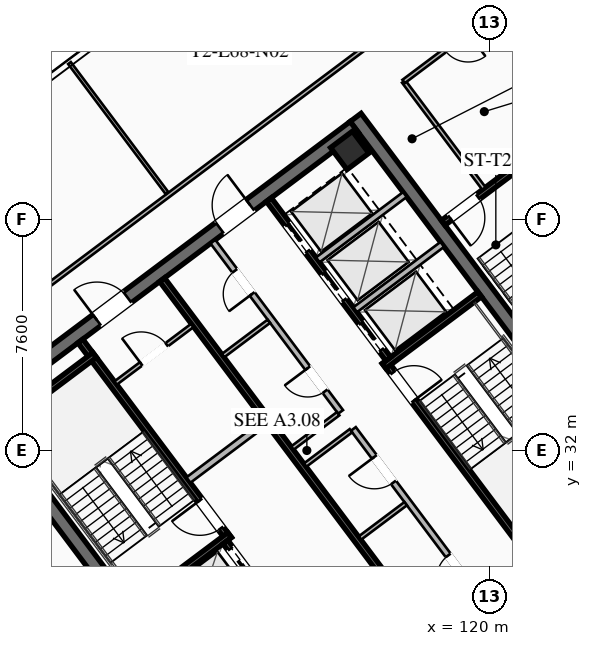
"""IFC4 building model, lengths in metres.
Left out: names, types, materials, properties, quantities, classifications, styles, units other than length and angle.
Written with IfcOpenShell. Run it as: python <this file> out.ifc"""

import sys

from ifc_helpers import new_model, si_unit, direction, frame, frame_2d, origin, origin_2d, place, context, subcontext, project, spatial, rectangle, hollow_rectangle, extrude, element, fill, save


model = new_model("IFC4")
c1 = context("Model", 3, precision=1e-05, world=origin(), true_north=direction((0.0, 1.0)))
c2 = subcontext(c1, "Body", "Model", "MODEL_VIEW")
j1 = project(units=[si_unit("LENGTHUNIT", "METRE"), si_unit("PLANEANGLEUNIT", "RADIAN")], contexts=[c1])
p1 = place(None, origin())
s1 = spatial("IfcSite", under=j1, at=p1, CompositionType="ELEMENT")
p2 = place(p1, origin())
s2 = spatial("IfcBuilding", under=s1, at=p2, CompositionType="ELEMENT")
p3 = place(p2, frame((0.0, 0.0, 251.4)))
s3 = spatial("IfcBuildingStorey", under=s2, at=p3, CompositionType="ELEMENT", Elevation=251.4)
for number, where, z_axis, x_axis in (
    (1, (112.396, 21.047, 0.0), (0.0, 0.0, 1.0), (-0.6, 0.8, 0.0)),
    (2, (115.604, 42.953, 0.0), (0.0, 0.0, 1.0), (0.6, -0.8, 0.0)),
):
    element("IfcWall", number, at=place(p3, frame(where, z_axis=z_axis, x_axis=x_axis)), inside=s3, PredefinedType="SHEAR", context=c2, shape_type="SweptSolid", body=[
        extrude(rectangle(XDim=15.6, YDim=0.45, at=frame_2d((7.8, 0.0))), origin(), (0.0, 0.0, 1.0), 4.0),
    ])
p4 = place(p3, frame((124.649, 30.518, 0.0), z_axis=(0.0, 0.0, 1.0), x_axis=(-0.8, -0.6, 0.0)))
e3 = element("IfcWall", 3, at=p4, inside=s3, PredefinedType="SHEAR", context=c2, shape_type="SweptSolid", body=[
    extrude(rectangle(XDim=15.26, YDim=0.45, at=frame_2d((7.63, 0.0))), origin(), (0.0, 0.0, 1.0), 4.0),
])
p5 = place(p4, frame((9.33, 0.0, 0.0)))
e4 = element("IfcOpeningElement", 4, at=p5, cuts=e3, PredefinedType="OPENING", context=c2, shape_type="SweptSolid", body=[
    extrude(rectangle(XDim=1.25, YDim=2.25, at=frame_2d((0.625, 1.125))), frame((0.0, 0.235, 0.0), z_axis=(0.0, -1.0, 0.0), x_axis=(1.0, 0.0, 0.0)), (0.0, 0.0, 1.0), 0.47),
])
p6 = place(p4, frame((4.28, 0.0, 0.0)))
e5 = element("IfcOpeningElement", 5, at=p6, cuts=e3, PredefinedType="OPENING", context=c2, shape_type="SweptSolid", body=[
    extrude(rectangle(XDim=1.25, YDim=2.25, at=frame_2d((0.625, 1.125))), frame((0.0, 0.235, 0.0), z_axis=(0.0, -1.0, 0.0), x_axis=(1.0, 0.0, 0.0)), (0.0, 0.0, 1.0), 0.47),
])
p7 = place(p3, frame((103.351, 33.482, 0.0), z_axis=(0.0, 0.0, 1.0), x_axis=(0.8, 0.6, 0.0)))
e6 = element("IfcWall", 6, at=p7, inside=s3, PredefinedType="SHEAR", context=c2, shape_type="SweptSolid", body=[
    extrude(rectangle(XDim=15.26, YDim=0.45, at=frame_2d((7.63, 0.0))), origin(), (0.0, 0.0, 1.0), 4.0),
])
p8 = place(p7, frame((4.68, 0.0, 0.0)))
e7 = element("IfcOpeningElement", 7, at=p8, cuts=e6, PredefinedType="OPENING", context=c2, shape_type="SweptSolid", body=[
    extrude(rectangle(XDim=1.25, YDim=2.25, at=frame_2d((0.625, 1.125))), frame((0.0, 0.235, 0.0), z_axis=(0.0, -1.0, 0.0), x_axis=(1.0, 0.0, 0.0)), (0.0, 0.0, 1.0), 0.47),
])
p9 = place(p7, frame((9.73, 0.0, 0.0)))
e8 = element("IfcOpeningElement", 8, at=p9, cuts=e6, PredefinedType="OPENING", context=c2, shape_type="SweptSolid", body=[
    extrude(rectangle(XDim=1.25, YDim=2.25, at=frame_2d((0.625, 1.125))), frame((0.0, 0.235, 0.0), z_axis=(0.0, -1.0, 0.0), x_axis=(1.0, 0.0, 0.0)), (0.0, 0.0, 1.0), 0.47),
])
p10 = place(p3, frame((115.41, 41.87, 0.0), z_axis=(0.0, 0.0, 1.0), x_axis=(0.799999996291, 0.600000004945, 0.0)))
e9 = element("IfcColumn", 9, at=p10, inside=s3, PredefinedType="COLUMN", context=c2, shape_type="SweptSolid", body=[
    extrude(hollow_rectangle(XDim=0.9, YDim=0.9, WallThickness=0.04, at=origin_2d()), origin(), (0.0, 0.0, 1.0), 3.78),
])
p11 = place(p3, frame((111.44, 29.08, 0.0), z_axis=(0.0, 0.0, 1.0), x_axis=(-0.59999041401, 0.800007189403, 0.0)))
e10 = element("IfcWall", 10, at=p11, inside=s3, PredefinedType="SHEAR", context=c2, shape_type="SweptSolid", body=[
    extrude(rectangle(XDim=8.15, YDim=0.2, at=frame_2d((4.075, 0.0))), origin(), (0.0, 0.0, 1.0), 3.78),
])
p12 = place(p11, frame((0.45, 0.0, 0.0)))
e11 = element("IfcOpeningElement", 11, at=p12, cuts=e10, PredefinedType="OPENING", context=c2, shape_type="SweptSolid", body=[
    extrude(rectangle(XDim=1.15, YDim=2.2, at=frame_2d((0.575, 1.1))), frame((0.0, 0.11, 0.0), z_axis=(0.0, -1.0, 0.0), x_axis=(1.0, 0.0, 0.0)), (0.0, 0.0, 1.0), 0.22),
])
for number, where, z_axis, x_axis in (
    (12, (108.316, 26.862, 0.0), (0.0, 0.0, 1.0), (0.8, 0.6, 0.0)),
    (13, (103.876, 32.782, 0.0), (0.0, 0.0, 1.0), (0.8, 0.6, 0.0)),
):
    element("IfcWall", number, at=place(p3, frame(where, z_axis=z_axis, x_axis=x_axis)), inside=s3, PredefinedType="SHEAR", context=c2, shape_type="SweptSolid", body=[
        extrude(rectangle(XDim=3.93, YDim=0.2, at=frame_2d((1.965, 0.0))), origin(), (0.0, 0.0, 1.0), 3.78),
    ])
p13 = place(p3, frame((116.56, 34.92, 0.0), z_axis=(0.0, 0.0, 1.0), x_axis=(0.59999041401, -0.800007189403, 0.0)))
e14 = element("IfcWall", 14, at=p13, inside=s3, PredefinedType="SHEAR", context=c2, shape_type="SweptSolid", body=[
    extrude(rectangle(XDim=8.15, YDim=0.2, at=frame_2d((4.075, 0.0))), origin(), (0.0, 0.0, 1.0), 3.78),
])
p14 = place(p13, frame((0.45, 0.0, 0.0)))
e15 = element("IfcOpeningElement", 15, at=p14, cuts=e14, PredefinedType="OPENING", context=c2, shape_type="SweptSolid", body=[
    extrude(rectangle(XDim=1.15, YDim=2.2, at=frame_2d((0.575, 1.1))), frame((0.0, 0.11, 0.0), z_axis=(0.0, -1.0, 0.0), x_axis=(1.0, 0.0, 0.0)), (0.0, 0.0, 1.0), 0.22),
])
p15 = place(p3, frame((116.54, 34.78, 0.0), z_axis=(0.0, 0.0, 1.0), x_axis=(0.800014909178, 0.599980120581, 0.0)))
e16 = element("IfcWall", 16, at=p15, inside=s3, PredefinedType="SHEAR", context=c2, shape_type="SweptSolid", body=[
    extrude(rectangle(XDim=3.93, YDim=0.2, at=frame_2d((1.965, 0.0))), origin(), (0.0, 0.0, 1.0), 3.78),
])
p16 = place(p3, frame((118.058, 25.856, 0.0), z_axis=(0.0, 0.0, 1.0), x_axis=(-0.600002657301, 0.799998007018, 0.0)))
e17 = element("IfcWall", 17, at=p16, inside=s3, PredefinedType="SHEAR", context=c2, shape_type="SweptSolid", body=[
    extrude(rectangle(XDim=14.7, YDim=0.2, at=frame_2d((7.35, 0.0))), origin(), (0.0, 0.0, 1.0), 3.78),
])
p17 = place(p3, frame((110.104, 31.028, 0.0), z_axis=(0.0, 0.0, 1.0), x_axis=(0.800018601094, 0.59997519774, 0.0)))
e18 = element("IfcWall", 18, at=p17, inside=s3, PredefinedType="SOLIDWALL", context=c2, shape_type="SweptSolid", body=[
    extrude(rectangle(XDim=3.15, YDim=0.22, at=frame_2d((1.575, 0.0))), origin(), (0.0, 0.0, 1.0), 2.971),
])
p18 = place(p3, frame((115.25, 23.75, 0.0), z_axis=(0.0, 0.0, 1.0), x_axis=(-0.599994036198, 0.800004472816, 0.0)))
e19 = element("IfcWall", 19, at=p18, inside=s3, PredefinedType="SHEAR", context=c2, shape_type="SweptSolid", body=[
    extrude(rectangle(XDim=6.55, YDim=0.2, at=frame_2d((3.275, 0.0))), origin(), (0.0, 0.0, 1.0), 3.78),
])
p19 = place(p18, frame((4.975, 0.0, 0.0)))
e20 = element("IfcOpeningElement", 20, at=p19, cuts=e19, PredefinedType="OPENING", context=c2, shape_type="SweptSolid", body=[
    extrude(rectangle(XDim=1.3, YDim=2.25, at=frame_2d((0.65, 1.125))), frame((0.0, 0.11, 0.0), z_axis=(0.0, -1.0, 0.0), x_axis=(1.0, 0.0, 0.0)), (0.0, 0.0, 1.0), 0.22),
])
p20 = place(p18, frame((2.975, 0.0, 0.0)))
e21 = element("IfcOpeningElement", 21, at=p20, cuts=e19, PredefinedType="OPENING", context=c2, shape_type="SweptSolid", body=[
    extrude(rectangle(XDim=1.3, YDim=2.25, at=frame_2d((0.65, 1.125))), frame((0.0, 0.11, 0.0), z_axis=(0.0, -1.0, 0.0), x_axis=(1.0, 0.0, 0.0)), (0.0, 0.0, 1.0), 0.22),
])
p21 = place(p18, frame((0.775, 0.0, 0.0)))
e22 = element("IfcOpeningElement", 22, at=p21, cuts=e19, PredefinedType="OPENING", context=c2, shape_type="SweptSolid", body=[
    extrude(rectangle(XDim=1.3, YDim=2.25, at=frame_2d((0.65, 1.125))), frame((0.0, 0.11, 0.0), z_axis=(0.0, -1.0, 0.0), x_axis=(1.0, 0.0, 0.0)), (0.0, 0.0, 1.0), 0.22),
])
p22 = place(p3, frame((112.75, 40.25, 0.0), z_axis=(0.0, 0.0, 1.0), x_axis=(0.599994036198, -0.800004472816, 0.0)))
e23 = element("IfcWall", 23, at=p22, inside=s3, PredefinedType="SHEAR", context=c2, shape_type="SweptSolid", body=[
    extrude(rectangle(XDim=6.55, YDim=0.2, at=frame_2d((3.275, 0.0))), origin(), (0.0, 0.0, 1.0), 3.78),
])
p23 = place(p22, frame((5.075, 0.0, 0.0)))
e24 = element("IfcOpeningElement", 24, at=p23, cuts=e23, PredefinedType="OPENING", context=c2, shape_type="SweptSolid", body=[
    extrude(rectangle(XDim=1.1, YDim=2.2, at=frame_2d((0.55, 1.1))), frame((0.0, 0.11, 0.0), z_axis=(0.0, -1.0, 0.0), x_axis=(1.0, 0.0, 0.0)), (0.0, 0.0, 1.0), 0.22),
])
p24 = place(p22, frame((3.025, 0.0, 0.0)))
e25 = element("IfcOpeningElement", 25, at=p24, cuts=e23, PredefinedType="OPENING", context=c2, shape_type="SweptSolid", body=[
    extrude(rectangle(XDim=1.1, YDim=2.2, at=frame_2d((0.55, 1.1))), frame((0.0, 0.11, 0.0), z_axis=(0.0, -1.0, 0.0), x_axis=(1.0, 0.0, 0.0)), (0.0, 0.0, 1.0), 0.22),
])
p25 = place(p22, frame((1.025, 0.0, 0.0)))
e26 = element("IfcOpeningElement", 26, at=p25, cuts=e23, PredefinedType="OPENING", context=c2, shape_type="SweptSolid", body=[
    extrude(rectangle(XDim=1.1, YDim=2.2, at=frame_2d((0.55, 1.1))), frame((0.0, 0.11, 0.0), z_axis=(0.0, -1.0, 0.0), x_axis=(1.0, 0.0, 0.0)), (0.0, 0.0, 1.0), 0.22),
])
for number, where, z_axis, x_axis in (
    (27, (115.59, 36.63, 0.0), (0.0, 0.0, 1.0), (0.8, 0.6, 0.0)),
    (28, (114.36, 38.27, 0.0), (0.0, 0.0, 1.0), (0.8, 0.6, 0.0)),
):
    element("IfcWall", number, at=place(p3, frame(where, z_axis=z_axis, x_axis=x_axis)), inside=s3, PredefinedType="SOLIDWALL", context=c2, shape_type="SweptSolid", body=[
        extrude(rectangle(XDim=3.58, YDim=0.2, at=frame_2d((1.79, 0.0))), origin(), (0.0, 0.0, 1.0), 3.78),
    ])
p26 = place(p3, frame((107.71, 34.22, 0.0), z_axis=(0.0, 0.0, 1.0), x_axis=(0.799981399002, 0.60002480053, 0.0)))
e29 = element("IfcWall", 29, at=p26, inside=s3, PredefinedType="PARTITIONING", context=c2, shape_type="SweptSolid", body=[
    extrude(rectangle(XDim=3.15, YDim=0.135, at=frame_2d((1.575, 0.0))), origin(), (0.0, 0.0, 1.0), 2.971),
])
p27 = place(p26, frame((1.05, 0.0, 0.0)))
e30 = element("IfcOpeningElement", 30, at=p27, cuts=e29, PredefinedType="OPENING", context=c2, shape_type="SweptSolid", body=[
    extrude(rectangle(XDim=1.05, YDim=2.2, at=frame_2d((0.525, 1.1))), frame((0.0, 0.077, 0.0), z_axis=(0.0, -1.0, 0.0), x_axis=(1.0, 0.0, 0.0)), (0.0, 0.0, 1.0), 0.155),
])
p28 = place(p3, frame((119.73, 27.11, 0.0), z_axis=(0.0, 0.0, 1.0), x_axis=(-0.600005580459, 0.799995814625, 0.0)))
e31 = element("IfcWall", 31, at=p28, inside=s3, PredefinedType="SOLIDWALL", context=c2, shape_type="SweptSolid", body=[
    extrude(rectangle(XDim=7.0, YDim=0.2, at=frame_2d((3.5, 0.0))), origin(), (0.0, 0.0, 1.0), 2.971),
])
p29 = place(p28, frame((0.85, 0.0, 0.0)))
e32 = element("IfcOpeningElement", 32, at=p29, cuts=e31, PredefinedType="OPENING", context=c2, shape_type="SweptSolid", body=[
    extrude(rectangle(XDim=0.95, YDim=2.05, at=frame_2d((0.475, 1.025))), frame((0.0, 0.11, 0.0), z_axis=(0.0, -1.0, 0.0), x_axis=(1.0, 0.0, 0.0)), (0.0, 0.0, 1.0), 0.22),
])
p30 = place(p28, frame((4.8, 0.0, 0.0)))
e33 = element("IfcOpeningElement", 33, at=p30, cuts=e31, PredefinedType="OPENING", context=c2, shape_type="SweptSolid", body=[
    extrude(rectangle(XDim=1.05, YDim=2.2, at=frame_2d((0.525, 1.1))), frame((0.0, 0.11, 0.0), z_axis=(0.0, -1.0, 0.0), x_axis=(1.0, 0.0, 0.0)), (0.0, 0.0, 1.0), 0.22),
])
for number, where, z_axis, x_axis in (
    (34, (113.946, 31.522, 0.0), (0.0, 0.0, 1.0), (0.8, 0.6, 0.0)),
    (35, (115.746, 29.122, 0.0), (0.0, 0.0, 1.0), (0.8, 0.6, 0.0)),
):
    element("IfcWall", number, at=place(p3, frame(where, z_axis=z_axis, x_axis=x_axis)), inside=s3, PredefinedType="PARTITIONING", context=c2, shape_type="SweptSolid", body=[
        extrude(rectangle(XDim=1.88, YDim=0.135, at=frame_2d((0.94, 0.0))), origin(), (0.0, 0.0, 1.0), 2.971),
    ])
p31 = place(p3, frame((115.11, 33.27, 0.0), z_axis=(0.0, 0.0, 1.0), x_axis=(-0.600011160345, 0.79999162962, 0.0)))
e36 = element("IfcWall", 36, at=p31, inside=s3, PredefinedType="SOLIDWALL", context=c2, shape_type="SweptSolid", body=[
    extrude(rectangle(XDim=7.0, YDim=0.2, at=frame_2d((3.5, 0.0))), origin(), (0.0, 0.0, 1.0), 2.971),
])
p32 = place(p31, frame((0.85, 0.0, 0.0)))
e37 = element("IfcOpeningElement", 37, at=p32, cuts=e36, PredefinedType="OPENING", context=c2, shape_type="SweptSolid", body=[
    extrude(rectangle(XDim=0.95, YDim=2.05, at=frame_2d((0.475, 1.025))), frame((0.0, 0.11, 0.0), z_axis=(0.0, -1.0, 0.0), x_axis=(1.0, 0.0, 0.0)), (0.0, 0.0, 1.0), 0.22),
])
p33 = place(p31, frame((4.85, 0.0, 0.0)))
e38 = element("IfcOpeningElement", 38, at=p33, cuts=e36, PredefinedType="OPENING", context=c2, shape_type="SweptSolid", body=[
    extrude(rectangle(XDim=0.95, YDim=2.05, at=frame_2d((0.475, 1.025))), frame((0.0, 0.11, 0.0), z_axis=(0.0, -1.0, 0.0), x_axis=(1.0, 0.0, 0.0)), (0.0, 0.0, 1.0), 0.22),
])
p34 = place(p3, frame((113.526, 32.082, 0.0), z_axis=(0.0, 0.0, 1.0), x_axis=(0.800046745961, 0.599937666993, 0.0)))
e39 = element("IfcWall", 39, at=p34, inside=s3, PredefinedType="PARTITIONING", context=c2, shape_type="SweptSolid", body=[
    extrude(rectangle(XDim=1.88, YDim=0.135, at=frame_2d((0.94, 0.0))), origin(), (0.0, 0.0, 1.0), 2.971),
])
p35 = place(p3, frame((111.246, 35.122, 0.0), z_axis=(0.0, 0.0, 1.0), x_axis=(0.8, 0.6, 0.0)))
e40 = element("IfcWall", 40, at=p35, inside=s3, PredefinedType="PARTITIONING", context=c2, shape_type="SweptSolid", body=[
    extrude(rectangle(XDim=1.88, YDim=0.135, at=frame_2d((0.94, 0.0))), origin(), (0.0, 0.0, 1.0), 2.971),
])
p36 = place(p3, frame((121.204, 41.528, 0.0), z_axis=(0.0, 0.0, 1.0), x_axis=(-0.800017232136, -0.599977023131, 0.0)))
e41 = element("IfcWall", 41, at=p36, inside=s3, PredefinedType="SHEAR", context=c2, shape_type="SweptSolid", body=[
    extrude(rectangle(XDim=3.4, YDim=0.2, at=frame_2d((1.7, 0.0))), origin(), (0.0, 0.0, 1.0), 3.78),
])
p37 = place(p36, frame((1.975, 0.0, 0.0)))
e42 = element("IfcOpeningElement", 42, at=p37, cuts=e41, PredefinedType="OPENING", context=c2, shape_type="SweptSolid", body=[
    extrude(rectangle(XDim=1.15, YDim=2.2, at=frame_2d((0.575, 1.1))), frame((0.0, 0.11, 0.0), z_axis=(0.0, -1.0, 0.0), x_axis=(1.0, 0.0, 0.0)), (0.0, 0.0, 1.0), 0.22),
])
p38 = place(p3, frame((119.824, 40.618, 0.0), z_axis=(0.0, 0.0, 1.0), x_axis=(-0.599982243973, 0.800013316712, 0.0)))
e43 = element("IfcWall", 43, at=p38, inside=s3, PredefinedType="PARTITIONING", context=c2, shape_type="SweptSolid", body=[
    extrude(rectangle(XDim=4.4, YDim=0.135, at=frame_2d((2.2, 0.0))), origin(), (0.0, 0.0, 1.0), 2.971),
])
p39 = place(p3, frame((99.746, 33.122, 0.0), z_axis=(0.0, 0.0, 1.0), x_axis=(0.800001242445, 0.599998343403, 0.0)))
e44 = element("IfcWall", 44, at=p39, inside=s3, PredefinedType="PARTITIONING", context=c2, shape_type="SweptSolid", body=[
    extrude(rectangle(XDim=23.58, YDim=0.135, at=frame_2d((11.79, 0.0))), origin(), (0.0, 0.0, 1.0), 2.971),
])
p40 = place(p39, frame((0.3, 0.0, 0.0)))
e45 = element("IfcOpeningElement", 45, at=p40, cuts=e44, PredefinedType="OPENING", context=c2, shape_type="SweptSolid", body=[
    extrude(rectangle(XDim=0.95, YDim=2.05, at=frame_2d((0.475, 1.025))), frame((0.0, 0.077, 0.0), z_axis=(0.0, -1.0, 0.0), x_axis=(1.0, 0.0, 0.0)), (0.0, 0.0, 1.0), 0.155),
])
p41 = place(p39, frame((22.33, 0.0, 0.0)))
e46 = element("IfcOpeningElement", 46, at=p41, cuts=e44, PredefinedType="OPENING", context=c2, shape_type="SweptSolid", body=[
    extrude(rectangle(XDim=0.95, YDim=2.05, at=frame_2d((0.475, 1.025))), frame((0.0, 0.077, 0.0), z_axis=(0.0, -1.0, 0.0), x_axis=(1.0, 0.0, 0.0)), (0.0, 0.0, 1.0), 0.155),
])
p42 = place(p3, frame((109.402, 40.464, 0.0), z_axis=(0.0, 0.0, 1.0), x_axis=(-0.600043807911, 0.799967142192, 0.0)))
e47 = element("IfcWall", 47, at=p42, inside=s3, PredefinedType="PARTITIONING", context=c2, shape_type="SweptSolid", body=[
    extrude(rectangle(XDim=5.35, YDim=0.11, at=frame_2d((2.675, 0.0))), origin(), (0.0, 0.0, 1.0), 2.971),
])
p43 = place(p3, frame((121.224, 47.168, 0.0), z_axis=(0.0, 0.0, 1.0), x_axis=(-0.8, -0.6, 0.0)))
e48 = element("IfcWall", 48, at=p43, inside=s3, PredefinedType="PARTITIONING", context=c2, shape_type="SweptSolid", body=[
    extrude(rectangle(XDim=5.05, YDim=0.135, at=frame_2d((2.525, 0.0))), origin(), (0.0, 0.0, 1.0), 2.971),
])
p44 = place(p43, frame((2.4, 0.0, 0.0)))
e49 = element("IfcOpeningElement", 49, at=p44, cuts=e48, PredefinedType="OPENING", context=c2, shape_type="SweptSolid", body=[
    extrude(rectangle(XDim=0.95, YDim=2.05, at=frame_2d((0.475, 1.025))), frame((0.0, 0.077, 0.0), z_axis=(0.0, -1.0, 0.0), x_axis=(1.0, 0.0, 0.0)), (0.0, 0.0, 1.0), 0.155),
])
p45 = place(p3, frame((111.86, 16.97, 0.0), z_axis=(0.0, 0.0, 1.0), x_axis=(-0.60000194242, 0.799998543181, 0.0)))
e50 = element("IfcWall", 50, at=p45, inside=s3, PredefinedType="PARTITIONING", context=c2, shape_type="SweptSolid", body=[
    extrude(rectangle(XDim=20.11, YDim=0.135, at=frame_2d((10.055, 0.0))), origin(), (0.0, 0.0, 1.0), 2.971),
])
p46 = place(p45, frame((0.3, 0.0, 0.0)))
e51 = element("IfcOpeningElement", 51, at=p46, cuts=e50, PredefinedType="OPENING", context=c2, shape_type="SweptSolid", body=[
    extrude(rectangle(XDim=0.95, YDim=2.05, at=frame_2d((0.475, 1.025))), frame((0.0, 0.077, 0.0), z_axis=(0.0, -1.0, 0.0), x_axis=(1.0, 0.0, 0.0)), (0.0, 0.0, 1.0), 0.155),
])
p47 = place(p8, origin())
e52 = element("IfcDoor", 52, at=p47, inside=s3, OperationType="SINGLE_SWING_LEFT", PredefinedType="DOOR", context=c2, shape_type="SweptSolid", body=[
    extrude(rectangle(XDim=1.25, YDim=2.25, at=frame_2d((0.625, 1.125))), frame((0.0, 0.025, 0.0), z_axis=(0.0, -1.0, 0.0), x_axis=(1.0, 0.0, 0.0)), (0.0, 0.0, 1.0), 0.05),
])
fill(e7, e52)
p48 = place(p9, origin())
e53 = element("IfcDoor", 53, at=p48, inside=s3, OperationType="SINGLE_SWING_RIGHT", PredefinedType="DOOR", context=c2, shape_type="SweptSolid", body=[
    extrude(rectangle(XDim=1.25, YDim=2.25, at=frame_2d((0.625, 1.125))), frame((0.0, 0.025, 0.0), z_axis=(0.0, -1.0, 0.0), x_axis=(1.0, 0.0, 0.0)), (0.0, 0.0, 1.0), 0.05),
])
fill(e8, e53)
p49 = place(p12, origin())
e54 = element("IfcDoor", 54, at=p49, inside=s3, OperationType="SINGLE_SWING_RIGHT", PredefinedType="DOOR", context=c2, shape_type="SweptSolid", body=[
    extrude(rectangle(XDim=1.15, YDim=2.2, at=frame_2d((0.575, 1.1))), frame((0.0, 0.025, 0.0), z_axis=(0.0, -1.0, 0.0), x_axis=(1.0, 0.0, 0.0)), (0.0, 0.0, 1.0), 0.05),
])
fill(e11, e54)
p50 = place(p14, origin())
e55 = element("IfcDoor", 55, at=p50, inside=s3, OperationType="SINGLE_SWING_RIGHT", PredefinedType="DOOR", context=c2, shape_type="SweptSolid", body=[
    extrude(rectangle(XDim=1.15, YDim=2.2, at=frame_2d((0.575, 1.1))), frame((0.0, 0.025, 0.0), z_axis=(0.0, -1.0, 0.0), x_axis=(1.0, 0.0, 0.0)), (0.0, 0.0, 1.0), 0.05),
])
fill(e15, e55)
p51 = place(p27, origin())
e56 = element("IfcDoor", 56, at=p51, inside=s3, OperationType="SINGLE_SWING_LEFT", PredefinedType="DOOR", context=c2, shape_type="SweptSolid", body=[
    extrude(rectangle(XDim=1.05, YDim=2.2, at=frame_2d((0.525, 1.1))), frame((0.0, 0.025, 0.0), z_axis=(0.0, -1.0, 0.0), x_axis=(1.0, 0.0, 0.0)), (0.0, 0.0, 1.0), 0.05),
])
fill(e30, e56)
p52 = place(p29, origin())
e57 = element("IfcDoor", 57, at=p52, inside=s3, OperationType="SINGLE_SWING_LEFT", PredefinedType="DOOR", context=c2, shape_type="SweptSolid", body=[
    extrude(rectangle(XDim=0.95, YDim=2.05, at=frame_2d((0.475, 1.025))), frame((0.0, 0.025, 0.0), z_axis=(0.0, -1.0, 0.0), x_axis=(1.0, 0.0, 0.0)), (0.0, 0.0, 1.0), 0.05),
])
fill(e32, e57)
p53 = place(p30, origin())
e58 = element("IfcDoor", 58, at=p53, inside=s3, OperationType="SINGLE_SWING_RIGHT", PredefinedType="DOOR", context=c2, shape_type="SweptSolid", body=[
    extrude(rectangle(XDim=1.05, YDim=2.2, at=frame_2d((0.525, 1.1))), frame((0.0, 0.025, 0.0), z_axis=(0.0, -1.0, 0.0), x_axis=(1.0, 0.0, 0.0)), (0.0, 0.0, 1.0), 0.05),
])
fill(e33, e58)
p54 = place(p32, origin())
e59 = element("IfcDoor", 59, at=p54, inside=s3, OperationType="SINGLE_SWING_RIGHT", PredefinedType="DOOR", context=c2, shape_type="SweptSolid", body=[
    extrude(rectangle(XDim=0.95, YDim=2.05, at=frame_2d((0.475, 1.025))), frame((0.0, 0.025, 0.0), z_axis=(0.0, -1.0, 0.0), x_axis=(1.0, 0.0, 0.0)), (0.0, 0.0, 1.0), 0.05),
])
fill(e37, e59)
p55 = place(p33, origin())
e60 = element("IfcDoor", 60, at=p55, inside=s3, OperationType="SINGLE_SWING_LEFT", PredefinedType="DOOR", context=c2, shape_type="SweptSolid", body=[
    extrude(rectangle(XDim=0.95, YDim=2.05, at=frame_2d((0.475, 1.025))), frame((0.0, 0.025, 0.0), z_axis=(0.0, -1.0, 0.0), x_axis=(1.0, 0.0, 0.0)), (0.0, 0.0, 1.0), 0.05),
])
fill(e38, e60)
p56 = place(p37, origin())
e61 = element("IfcDoor", 61, at=p56, inside=s3, OperationType="SINGLE_SWING_RIGHT", PredefinedType="DOOR", context=c2, shape_type="SweptSolid", body=[
    extrude(rectangle(XDim=1.15, YDim=2.2, at=frame_2d((0.575, 1.1))), frame((0.0, 0.025, 0.0), z_axis=(0.0, -1.0, 0.0), x_axis=(1.0, 0.0, 0.0)), (0.0, 0.0, 1.0), 0.05),
])
fill(e42, e61)
p57 = place(p19, origin())
e62 = element("IfcDoor", 62, at=p57, inside=s3, OperationType="SLIDING_TO_LEFT", PredefinedType="DOOR", context=c2, shape_type="SweptSolid", body=[
    extrude(rectangle(XDim=1.3, YDim=2.25, at=frame_2d((0.65, 1.125))), frame((0.0, 0.025, 0.0), z_axis=(0.0, -1.0, 0.0), x_axis=(1.0, 0.0, 0.0)), (0.0, 0.0, 1.0), 0.05),
])
fill(e20, e62)
p58 = place(p23, origin())
e63 = element("IfcDoor", 63, at=p58, inside=s3, OperationType="SLIDING_TO_LEFT", PredefinedType="DOOR", context=c2, shape_type="SweptSolid", body=[
    extrude(rectangle(XDim=1.1, YDim=2.2, at=frame_2d((0.55, 1.1))), frame((0.0, 0.025, 0.0), z_axis=(0.0, -1.0, 0.0), x_axis=(1.0, 0.0, 0.0)), (0.0, 0.0, 1.0), 0.05),
])
fill(e24, e63)
p59 = place(p24, origin())
e64 = element("IfcDoor", 64, at=p59, inside=s3, OperationType="SLIDING_TO_LEFT", PredefinedType="DOOR", context=c2, shape_type="SweptSolid", body=[
    extrude(rectangle(XDim=1.1, YDim=2.2, at=frame_2d((0.55, 1.1))), frame((0.0, 0.025, 0.0), z_axis=(0.0, -1.0, 0.0), x_axis=(1.0, 0.0, 0.0)), (0.0, 0.0, 1.0), 0.05),
])
fill(e25, e64)
p60 = place(p25, origin())
e65 = element("IfcDoor", 65, at=p60, inside=s3, OperationType="SLIDING_TO_LEFT", PredefinedType="DOOR", context=c2, shape_type="SweptSolid", body=[
    extrude(rectangle(XDim=1.1, YDim=2.2, at=frame_2d((0.55, 1.1))), frame((0.0, 0.025, 0.0), z_axis=(0.0, -1.0, 0.0), x_axis=(1.0, 0.0, 0.0)), (0.0, 0.0, 1.0), 0.05),
])
fill(e26, e65)
save(model, sys.argv[1])
